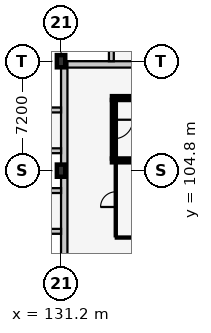
"""IFC4 building model, lengths in metres.
Left out: names, types, materials, properties, quantities, classifications, styles, units other than length and angle.
Written with IfcOpenShell. Run it as: python <this file> out.ifc"""

import sys

from ifc_helpers import new_model, si_unit, direction, frame, frame_2d, origin, origin_2d, place, context, subcontext, project, spatial, rectangle, extrude, element, fill, save


model = new_model("IFC4")
c1 = context("Model", 3, precision=1e-05, world=origin(), true_north=direction((0.0, 1.0)))
c2 = subcontext(c1, "Body", "Model", "MODEL_VIEW")
j1 = project(units=[si_unit("LENGTHUNIT", "METRE"), si_unit("PLANEANGLEUNIT", "RADIAN")], contexts=[c1])
p1 = place(None, origin())
s1 = spatial("IfcSite", under=j1, at=p1, CompositionType="ELEMENT")
p2 = place(p1, origin())
s2 = spatial("IfcBuilding", under=s1, at=p2, CompositionType="ELEMENT")
p3 = place(p2, frame((0.0, 0.0, 9.6)))
s3 = spatial("IfcBuildingStorey", under=s2, at=p3, CompositionType="ELEMENT", Elevation=9.6)
for number, where, z_axis, x_axis in (
    (1, (131.2, 104.8, 0.0), (0.0, 0.0, 1.0), (1.0, 0.0, 0.0)),
    (2, (131.2, 112.0, 0.0), (0.0, 0.0, 1.0), (1.0, 0.0, 0.0)),
):
    element("IfcColumn", number, at=place(p3, frame(where, z_axis=z_axis, x_axis=x_axis)), inside=s3, PredefinedType="COLUMN", context=c2, shape_type="SweptSolid", body=[
        extrude(rectangle(XDim=0.55, YDim=0.8, at=origin_2d()), origin(), (0.0, 0.0, 1.0), 4.2),
    ])
p4 = place(p3, frame((131.2, 111.79, 0.0), z_axis=(0.0, 0.0, 1.0), x_axis=(1.0, 0.0, 0.0)))
e3 = element("IfcWall", 3, at=p4, inside=s3, PredefinedType="SOLIDWALL", context=c2, shape_type="SweptSolid", body=[
    extrude(rectangle(XDim=28.8, YDim=0.42, at=frame_2d((14.4, 0.0))), origin(), (0.0, 0.0, 1.0), 3.245),
])
p5 = place(p3, frame((134.51, 112.0, 0.0), z_axis=(0.0, 0.0, 1.0), x_axis=(0.0, 1.0, 0.0)))
e4 = element("IfcWall", 4, at=p5, inside=s3, PredefinedType="SOLIDWALL", context=c2, shape_type="SweptSolid", body=[
    extrude(rectangle(XDim=1.35, YDim=0.32, at=frame_2d((0.675, 0.0))), origin(), (0.0, 0.0, 1.0), 3.93),
])
p6 = place(p3, frame((131.41, 83.2, 0.0), z_axis=(0.0, 0.0, 1.0), x_axis=(0.0, 1.0, 0.0)))
e5 = element("IfcWall", 5, at=p6, inside=s3, PredefinedType="SOLIDWALL", context=c2, shape_type="SweptSolid", body=[
    extrude(rectangle(XDim=28.8, YDim=0.42, at=frame_2d((14.4, 0.0))), origin(), (0.0, 0.0, 1.0), 3.345),
])
p7 = place(p3, frame((131.2, 100.81, 0.0), z_axis=(0.0, 0.0, 1.0), x_axis=(-1.0, 0.0, 0.0)))
e6 = element("IfcWall", 6, at=p7, inside=s3, PredefinedType="SOLIDWALL", context=c2, shape_type="SweptSolid", body=[
    extrude(rectangle(XDim=1.35, YDim=0.32, at=frame_2d((0.675, 0.0))), origin(), (0.0, 0.0, 1.0), 3.93),
])
for number, where, z_axis, x_axis in (
    (7, (131.2, 103.49, 0.0), (0.0, 0.0, 1.0), (-1.0, 0.0, 0.0)),
    (8, (131.2, 106.11, 0.0), (0.0, 0.0, 1.0), (-1.0, 0.0, 0.0)),
):
    element("IfcWall", number, at=place(p3, frame(where, z_axis=z_axis, x_axis=x_axis)), inside=s3, PredefinedType="SOLIDWALL", context=c2, shape_type="SweptSolid", body=[
        extrude(rectangle(XDim=1.793, YDim=0.32, at=frame_2d((0.896, 0.0))), origin(), (0.0, 0.0, 1.0), 3.93),
    ])
p8 = place(p3, frame((131.2, 108.79, 0.0), z_axis=(0.0, 0.0, 1.0), x_axis=(-1.0, 0.0, 0.0)))
e9 = element("IfcWall", 9, at=p8, inside=s3, PredefinedType="SOLIDWALL", context=c2, shape_type="SweptSolid", body=[
    extrude(rectangle(XDim=1.35, YDim=0.32, at=frame_2d((0.675, 0.0))), origin(), (0.0, 0.0, 1.0), 3.93),
])
for number, where, z_axis, x_axis in (
    (10, (134.55, 105.475, 0.0), (0.0, 0.0, 1.0), (1.0, 0.0, 0.0)),
    (11, (143.45, 109.575, 0.0), (0.0, 0.0, 1.0), (-1.0, 0.0, 0.0)),
):
    element("IfcWall", number, at=place(p3, frame(where, z_axis=z_axis, x_axis=x_axis)), inside=s3, PredefinedType="SHEAR", context=c2, shape_type="SweptSolid", body=[
        extrude(rectangle(XDim=8.9, YDim=0.25, at=frame_2d((4.45, 0.0))), origin(), (0.0, 0.0, 1.0), 3.95),
    ])
p9 = place(p3, frame((134.675, 109.45, 0.0), z_axis=(0.0, 0.0, 1.0), x_axis=(0.0, -1.0, 0.0)))
e12 = element("IfcWall", 12, at=p9, inside=s3, PredefinedType="SHEAR", context=c2, shape_type="SweptSolid", body=[
    extrude(rectangle(XDim=3.85, YDim=0.25, at=frame_2d((1.925, 0.0))), origin(), (0.0, 0.0, 1.0), 3.95),
])
p10 = place(p9, frame((1.3, 0.0, 0.0)))
e13 = element("IfcOpeningElement", 13, at=p10, cuts=e12, PredefinedType="OPENING", context=c2, shape_type="SweptSolid", body=[
    extrude(rectangle(XDim=1.25, YDim=2.15, at=frame_2d((0.625, 1.075))), frame((0.0, 0.137, 0.0), z_axis=(0.0, -1.0, 0.0), x_axis=(1.0, 0.0, 0.0)), (0.0, 0.0, 1.0), 0.274),
])
p11 = place(p3, frame((134.8, 100.4, 0.0), z_axis=(0.0, 0.0, 1.0), x_axis=(1.0, 0.0, 0.0)))
e14 = element("IfcWall", 14, at=p11, inside=s3, PredefinedType="PARTITIONING", context=c2, shape_type="SweptSolid", body=[
    extrude(rectangle(XDim=2.6, YDim=0.14, at=frame_2d((1.3, 0.0))), origin(), (0.0, 0.0, 1.0), 3.95),
])
p12 = place(p3, frame((134.8, 100.48, 0.0), z_axis=(0.0, 0.0, 1.0), x_axis=(0.0, 1.0, 0.0)))
e15 = element("IfcWall", 15, at=p12, inside=s3, PredefinedType="PARTITIONING", context=c2, shape_type="SweptSolid", body=[
    extrude(rectangle(XDim=4.86, YDim=0.14, at=frame_2d((2.43, 0.0))), origin(), (0.0, 0.0, 1.0), 3.675),
])
p13 = place(p12, frame((1.93, 0.0, 0.0)))
e16 = element("IfcOpeningElement", 16, at=p13, cuts=e15, PredefinedType="OPENING", context=c2, shape_type="SweptSolid", body=[
    extrude(rectangle(XDim=1.0, YDim=2.1, at=frame_2d((0.5, 1.05))), frame((0.0, 0.082, 0.0), z_axis=(0.0, -1.0, 0.0), x_axis=(1.0, 0.0, 0.0)), (0.0, 0.0, 1.0), 0.164),
])
p14 = place(p10, origin())
e17 = element("IfcDoor", 17, at=p14, inside=s3, OperationType="SINGLE_SWING_LEFT", PredefinedType="DOOR", context=c2, shape_type="SweptSolid", body=[
    extrude(rectangle(XDim=1.25, YDim=2.15, at=frame_2d((0.625, 1.075))), frame((0.0, 0.025, 0.0), z_axis=(0.0, -1.0, 0.0), x_axis=(1.0, 0.0, 0.0)), (0.0, 0.0, 1.0), 0.05),
])
fill(e13, e17)
p15 = place(p13, origin())
e18 = element("IfcDoor", 18, at=p15, inside=s3, OperationType="SINGLE_SWING_LEFT", PredefinedType="DOOR", context=c2, shape_type="SweptSolid", body=[
    extrude(rectangle(XDim=1.0, YDim=2.1, at=frame_2d((0.5, 1.05))), frame((0.0, 0.025, 0.0), z_axis=(0.0, -1.0, 0.0), x_axis=(1.0, 0.0, 0.0)), (0.0, 0.0, 1.0), 0.05),
])
fill(e16, e18)
save(model, sys.argv[1])
